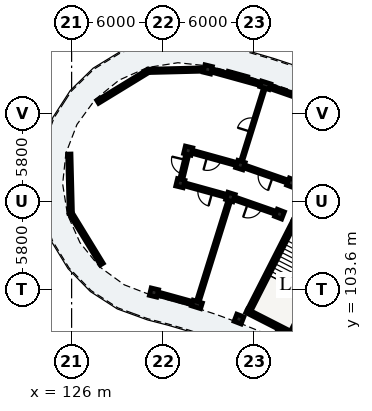
"""IFC4 building model, lengths in metres.
Left out: names, types, materials, properties, quantities, classifications, styles, units other than length and angle.
Written with IfcOpenShell. Run it as: python <this file> out.ifc"""

import sys

from ifc_helpers import new_model, si_unit, direction, frame, frame_2d, origin, origin_2d, place, context, subcontext, project, spatial, rectangle, extrude, element, fill, save


model = new_model("IFC4")
c1 = context("Model", 3, precision=1e-05, world=origin(), true_north=direction((0.0, 1.0)))
c2 = subcontext(c1, "Body", "Model", "MODEL_VIEW")
j1 = project(units=[si_unit("LENGTHUNIT", "METRE"), si_unit("PLANEANGLEUNIT", "RADIAN")], contexts=[c1])
p1 = place(None, origin())
s1 = spatial("IfcSite", under=j1, at=p1, CompositionType="ELEMENT")
p2 = place(p1, origin())
s2 = spatial("IfcBuilding", under=s1, at=p2, CompositionType="ELEMENT")
p3 = place(p2, frame((0.0, 0.0, 35.72)))
s3 = spatial("IfcBuildingStorey", under=s2, at=p3, CompositionType="ELEMENT", Elevation=35.72)
p4 = place(p3, frame((140.684, 108.139, 0.0), z_axis=(0.0, 0.0, 1.0), x_axis=(-0.453992276384, -0.891005618941, 0.0)))
e1 = element("IfcWall", 1, at=p4, inside=s3, PredefinedType="SHEAR", context=c2, shape_type="SweptSolid", body=[
    extrude(rectangle(XDim=6.6, YDim=0.25, at=frame_2d((3.3, 0.0))), origin(), (0.0, 0.0, 1.0), 3.11),
])
p5 = place(p3, frame((137.52, 102.203, 0.0), z_axis=(0.0, 0.0, 1.0), x_axis=(0.891003540237, -0.453996356025, 0.0)))
e2 = element("IfcWall", 2, at=p5, inside=s3, PredefinedType="SHEAR", context=c2, shape_type="SweptSolid", body=[
    extrude(rectangle(XDim=3.42, YDim=0.25, at=frame_2d((1.71, 0.0))), origin(), (0.0, 0.0, 1.0), 3.11),
])
p6 = place(p3, frame((143.509, 106.699, 0.0), z_axis=(0.0, 0.0, 1.0), x_axis=(-0.453992276384, -0.891005618941, 0.0)))
e3 = element("IfcWall", 3, at=p6, inside=s3, PredefinedType="SHEAR", context=c2, shape_type="SweptSolid", body=[
    extrude(rectangle(XDim=6.6, YDim=0.25, at=frame_2d((3.3, 0.0))), origin(), (0.0, 0.0, 1.0), 3.11),
])
p7 = place(p6, frame((0.22, 0.0, 0.0)))
e4 = element("IfcOpeningElement", 4, at=p7, cuts=e3, PredefinedType="OPENING", context=c2, shape_type="SweptSolid", body=[
    extrude(rectangle(XDim=1.05, YDim=2.15, at=frame_2d((0.525, 1.075))), frame((0.0, 0.135, 0.0), z_axis=(0.0, -1.0, 0.0), x_axis=(1.0, 0.0, 0.0)), (0.0, 0.0, 1.0), 0.27),
])
p8 = place(p3, frame((139.707, 100.522, 0.0), z_axis=(0.0, 0.0, 1.0), x_axis=(0.420859860775, 0.907125668024, 0.0)))
e5 = element("IfcColumn", 5, at=p8, inside=s3, PredefinedType="PILASTER", context=c2, shape_type="SweptSolid", body=[
    extrude(rectangle(XDim=0.39, YDim=0.63, at=origin_2d()), origin(), (0.0, 0.0, 1.0), 3.115),
])
for number, where, z_axis, x_axis in (
    (6, (137.01, 101.667, 0.0), (0.0, 0.0, 1.0), (0.36, 0.933, 0.0)),
    (7, (139.675, 108.57, 0.0), (0.0, 0.0, 1.0), (0.36, 0.933, 0.0)),
    (8, (140.468, 110.622, 0.0), (0.0, 0.0, 1.0), (0.36, 0.933, 0.0)),
):
    element("IfcColumn", number, at=place(p3, frame(where, z_axis=z_axis, x_axis=x_axis)), inside=s3, PredefinedType="COLUMN", context=c2, shape_type="SweptSolid", body=[
        extrude(rectangle(XDim=0.5, YDim=0.5, at=origin_2d()), origin(), (0.0, 0.0, 1.0), 3.115),
    ])
p9 = place(p3, frame((134.243, 102.631, 0.0), z_axis=(0.0, 0.0, 1.0), x_axis=(0.297930225503, 0.954587649581, 0.0)))
e9 = element("IfcColumn", 9, at=p9, inside=s3, PredefinedType="PILASTER", context=c2, shape_type="SweptSolid", body=[
    extrude(rectangle(XDim=0.39, YDim=0.63, at=origin_2d()), origin(), (0.0, 0.0, 1.0), 3.115),
])
for number, where, z_axis, x_axis in (
    (10, (136.448, 109.695, 0.0), (0.0, 0.0, 1.0), (0.298, 0.955, 0.0)),
    (11, (137.103, 111.795, 0.0), (0.0, 0.0, 1.0), (0.298, 0.955, 0.0)),
):
    element("IfcColumn", number, at=place(p3, frame(where, z_axis=z_axis, x_axis=x_axis)), inside=s3, PredefinedType="COLUMN", context=c2, shape_type="SweptSolid", body=[
        extrude(rectangle(XDim=0.5, YDim=0.5, at=origin_2d()), origin(), (0.0, 0.0, 1.0), 3.115),
    ])
p10 = place(p3, frame((138.742, 117.046, 0.0), z_axis=(0.0, 0.0, 1.0), x_axis=(0.297930225503, 0.954587649581, 0.0)))
e12 = element("IfcColumn", 12, at=p10, inside=s3, PredefinedType="PILASTER", context=c2, shape_type="SweptSolid", body=[
    extrude(rectangle(XDim=0.39, YDim=0.63, at=origin_2d()), origin(), (0.0, 0.0, 1.0), 3.115),
])
for number, where, z_axis, x_axis in (
    (13, (131.418, 103.412, 0.0), (0.0, 0.0, 1.0), (0.234, 0.972, 0.0)),
    (14, (133.153, 110.606, 0.0), (0.0, 0.0, 1.0), (0.234, 0.972, 0.0)),
    (15, (133.669, 112.744, 0.0), (0.0, 0.0, 1.0), (0.234, 0.972, 0.0)),
    (16, (134.958, 118.091, 0.0), (0.0, 0.0, 1.0), (0.234, 0.972, 0.0)),
):
    element("IfcColumn", number, at=place(p3, frame(where, z_axis=z_axis, x_axis=x_axis)), inside=s3, PredefinedType="COLUMN", context=c2, shape_type="SweptSolid", body=[
        extrude(rectangle(XDim=0.5, YDim=0.5, at=origin_2d()), origin(), (0.0, 0.0, 1.0), 3.115),
    ])
p11 = place(p3, frame((142.241, 115.826, 0.0), z_axis=(0.0, 0.0, 1.0), x_axis=(-0.944250036963, 0.329229202373, 0.0)))
e17 = element("IfcWall", 17, at=p11, inside=s3, PredefinedType="SOLIDWALL", context=c2, shape_type="SweptSolid", body=[
    extrude(rectangle(XDim=3.541, YDim=0.22, at=frame_2d((1.771, 0.0))), origin(), (0.0, 0.0, 1.0), 2.355),
])
p12 = place(p11, frame((1.17, 0.0, 0.55)))
e18 = element("IfcOpeningElement", 18, at=p12, cuts=e17, PredefinedType="OPENING", context=c2, shape_type="SweptSolid", body=[
    extrude(rectangle(XDim=1.2, YDim=1.51, at=frame_2d((0.6, 0.755))), frame((0.0, 0.12, 0.0), z_axis=(0.0, -1.0, 0.0), x_axis=(1.0, 0.0, 0.0)), (0.0, 0.0, 1.0), 0.24),
])
p13 = place(p3, frame((138.583, 117.09, 0.0), z_axis=(0.0, 0.0, 1.0), x_axis=(-0.963891366843, 0.266295762125, 0.0)))
e19 = element("IfcWall", 19, at=p13, inside=s3, PredefinedType="SOLIDWALL", context=c2, shape_type="SweptSolid", body=[
    extrude(rectangle(XDim=3.541, YDim=0.22, at=frame_2d((1.771, 0.0))), origin(), (0.0, 0.0, 1.0), 2.355),
])
p14 = place(p13, frame((1.11, 0.0, 0.55)))
e20 = element("IfcOpeningElement", 20, at=p14, cuts=e19, PredefinedType="OPENING", context=c2, shape_type="SweptSolid", body=[
    extrude(rectangle(XDim=1.32, YDim=1.585, at=frame_2d((0.66, 0.792))), frame((0.0, 0.12, 0.0), z_axis=(0.0, -1.0, 0.0), x_axis=(1.0, 0.0, 0.0)), (0.0, 0.0, 1.0), 0.24),
])
p15 = place(p3, frame((134.084, 102.675, 0.0), z_axis=(0.0, 0.0, 1.0), x_axis=(-0.963872968618, 0.26636234788, 0.0)))
e21 = element("IfcWall", 21, at=p15, inside=s3, PredefinedType="SOLIDWALL", context=c2, shape_type="SweptSolid", body=[
    extrude(rectangle(XDim=2.545, YDim=0.22, at=frame_2d((1.273, 0.0))), origin(), (0.0, 0.0, 1.0), 2.355),
])
p16 = place(p15, frame((0.473, 0.0, 0.55)))
e22 = element("IfcOpeningElement", 22, at=p16, cuts=e21, PredefinedType="OPENING", context=c2, shape_type="SweptSolid", body=[
    extrude(rectangle(XDim=1.6, YDim=1.535, at=frame_2d((0.8, 0.768))), frame((0.0, 0.12, 0.0), z_axis=(0.0, -1.0, 0.0), x_axis=(1.0, 0.0, 0.0)), (0.0, 0.0, 1.0), 0.24),
])
p17 = place(p3, frame((127.986, 105.28, 0.0), z_axis=(0.0, 0.0, 1.0), x_axis=(-0.521652131435, 0.85315828178, 0.0)))
e23 = element("IfcWall", 23, at=p17, inside=s3, PredefinedType="SOLIDWALL", context=c2, shape_type="SweptSolid", body=[
    extrude(rectangle(XDim=3.908, YDim=0.22, at=frame_2d((1.954, 0.0))), origin(), (0.0, 0.0, 1.0), 2.355),
])
p18 = place(p3, frame((125.947, 108.614, 0.0), z_axis=(0.0, 0.0, 1.0), x_axis=(-0.02523880178, 0.999681450706, 0.0)))
e24 = element("IfcWall", 24, at=p18, inside=s3, PredefinedType="SOLIDWALL", context=c2, shape_type="SweptSolid", body=[
    extrude(rectangle(XDim=3.908, YDim=0.22, at=frame_2d((1.954, 0.0))), origin(), (0.0, 0.0, 1.0), 2.355),
])
p19 = place(p18, frame((1.029, 0.0, 0.4)))
e25 = element("IfcOpeningElement", 25, at=p19, cuts=e24, PredefinedType="OPENING", context=c2, shape_type="SweptSolid", body=[
    extrude(rectangle(XDim=1.85, YDim=1.72, at=frame_2d((0.925, 0.86))), frame((0.0, 0.12, 0.0), z_axis=(0.0, -1.0, 0.0), x_axis=(1.0, 0.0, 0.0)), (0.0, 0.0, 1.0), 0.24),
])
p20 = place(p3, frame((127.717, 115.954, 0.0), z_axis=(0.0, 0.0, 1.0), x_axis=(0.85314128216, 0.521679933171, 0.0)))
e26 = element("IfcWall", 26, at=p20, inside=s3, PredefinedType="SOLIDWALL", context=c2, shape_type="SweptSolid", body=[
    extrude(rectangle(XDim=3.908, YDim=0.22, at=frame_2d((1.954, 0.0))), origin(), (0.0, 0.0, 1.0), 2.355),
])
p21 = place(p3, frame((131.051, 117.993, 0.0), z_axis=(0.0, 0.0, 1.0), x_axis=(0.999683064576, 0.025174796915, 0.0)))
e27 = element("IfcWall", 27, at=p21, inside=s3, PredefinedType="SOLIDWALL", context=c2, shape_type="SweptSolid", body=[
    extrude(rectangle(XDim=3.908, YDim=0.22, at=frame_2d((1.954, 0.0))), origin(), (0.0, 0.0, 1.0), 2.355),
])
p22 = place(p21, frame((1.029, 0.0, 0.4)))
e28 = element("IfcOpeningElement", 28, at=p22, cuts=e27, PredefinedType="OPENING", context=c2, shape_type="SweptSolid", body=[
    extrude(rectangle(XDim=1.85, YDim=1.72, at=frame_2d((0.925, 0.86))), frame((0.0, 0.12, 0.0), z_axis=(0.0, -1.0, 0.0), x_axis=(1.0, 0.0, 0.0)), (0.0, 0.0, 1.0), 0.24),
])
p23 = place(p3, frame((140.137, 110.738, 0.0), z_axis=(0.0, 0.0, 1.0), x_axis=(-0.944253820929, 0.329218349522, 0.0)))
e29 = element("IfcWall", 29, at=p23, inside=s3, PredefinedType="PARTITIONING", context=c2, shape_type="SweptSolid", body=[
    extrude(rectangle(XDim=2.863, YDim=0.205, at=frame_2d((1.432, 0.0))), origin(), (0.0, 0.0, 1.0), 2.37),
])
p24 = place(p23, frame((0.947, 0.0, 0.0)))
e30 = element("IfcOpeningElement", 30, at=p24, cuts=e29, PredefinedType="OPENING", context=c2, shape_type="SweptSolid", body=[
    extrude(rectangle(XDim=0.97, YDim=2.15, at=frame_2d((0.485, 1.075))), frame((0.0, 0.113, 0.0), z_axis=(0.0, -1.0, 0.0), x_axis=(1.0, 0.0, 0.0)), (0.0, 0.0, 1.0), 0.225),
])
p25 = place(p3, frame((139.345, 108.685, 0.0), z_axis=(0.0, 0.0, 1.0), x_axis=(-0.944265123647, 0.329185929627, 0.0)))
e31 = element("IfcWall", 31, at=p25, inside=s3, PredefinedType="PARTITIONING", context=c2, shape_type="SweptSolid", body=[
    extrude(rectangle(XDim=2.718, YDim=0.205, at=frame_2d((1.359, 0.0))), origin(), (0.0, 0.0, 1.0), 2.37),
])
p26 = place(p25, frame((0.874, 0.0, 0.0)))
e32 = element("IfcOpeningElement", 32, at=p26, cuts=e31, PredefinedType="OPENING", context=c2, shape_type="SweptSolid", body=[
    extrude(rectangle(XDim=0.97, YDim=2.15, at=frame_2d((0.485, 1.075))), frame((0.0, 0.113, 0.0), z_axis=(0.0, -1.0, 0.0), x_axis=(1.0, 0.0, 0.0)), (0.0, 0.0, 1.0), 0.225),
])
p27 = place(p3, frame((137.222, 112.177, 0.0), z_axis=(0.0, 0.0, 1.0), x_axis=(0.297905254614, 0.954595442726, 0.0)))
e33 = element("IfcWall", 33, at=p27, inside=s3, PredefinedType="PARTITIONING", context=c2, shape_type="SweptSolid", body=[
    extrude(rectangle(XDim=4.7, YDim=0.125, at=frame_2d((2.35, 0.0))), origin(), (0.0, 0.0, 1.0), 2.37),
])
p28 = place(p27, frame((1.895, 0.0, 0.0)))
e34 = element("IfcOpeningElement", 34, at=p28, cuts=e33, PredefinedType="OPENING", context=c2, shape_type="SweptSolid", body=[
    extrude(rectangle(XDim=0.91, YDim=2.1, at=frame_2d((0.455, 1.05))), frame((0.0, 0.073, 0.0), z_axis=(0.0, -1.0, 0.0), x_axis=(1.0, 0.0, 0.0)), (0.0, 0.0, 1.0), 0.145),
])
p29 = place(p3, frame((134.362, 103.013, 0.0), z_axis=(0.0, 0.0, 1.0), x_axis=(0.2979590431, 0.954578655028, 0.0)))
e35 = element("IfcWall", 35, at=p29, inside=s3, PredefinedType="PARTITIONING", context=c2, shape_type="SweptSolid", body=[
    extrude(rectangle(XDim=6.6, YDim=0.185, at=frame_2d((3.3, 0.0))), origin(), (0.0, 0.0, 1.0), 2.37),
])
p30 = place(p3, frame((136.766, 111.889, 0.0), z_axis=(0.0, 0.0, 1.0), x_axis=(-0.963890789093, 0.266297853356, 0.0)))
e36 = element("IfcWall", 36, at=p30, inside=s3, PredefinedType="PARTITIONING", context=c2, shape_type="SweptSolid", body=[
    extrude(rectangle(XDim=2.863, YDim=0.205, at=frame_2d((1.432, 0.0))), origin(), (0.0, 0.0, 1.0), 2.37),
])
p31 = place(p30, frame((0.957, 0.0, 0.0)))
e37 = element("IfcOpeningElement", 37, at=p31, cuts=e36, PredefinedType="OPENING", context=c2, shape_type="SweptSolid", body=[
    extrude(rectangle(XDim=0.95, YDim=2.13, at=frame_2d((0.475, 1.065))), frame((0.0, 0.113, 0.0), z_axis=(0.0, -1.0, 0.0), x_axis=(1.0, 0.0, 0.0)), (0.0, 0.0, 1.0), 0.225),
])
p32 = place(p3, frame((136.11, 109.789, 0.0), z_axis=(0.0, 0.0, 1.0), x_axis=(-0.96388375821, 0.266323301006, 0.0)))
e38 = element("IfcWall", 38, at=p32, inside=s3, PredefinedType="PARTITIONING", context=c2, shape_type="SweptSolid", body=[
    extrude(rectangle(XDim=2.718, YDim=0.205, at=frame_2d((1.359, 0.0))), origin(), (0.0, 0.0, 1.0), 2.37),
])
p33 = place(p32, frame((0.884, 0.0, 0.0)))
e39 = element("IfcOpeningElement", 39, at=p33, cuts=e38, PredefinedType="OPENING", context=c2, shape_type="SweptSolid", body=[
    extrude(rectangle(XDim=0.95, YDim=2.13, at=frame_2d((0.475, 1.065))), frame((0.0, 0.113, 0.0), z_axis=(0.0, -1.0, 0.0), x_axis=(1.0, 0.0, 0.0)), (0.0, 0.0, 1.0), 0.225),
])
p34 = place(p3, frame((133.165, 110.654, 0.0), z_axis=(0.0, 0.0, 1.0), x_axis=(0.23437535251, 0.972146179407, 0.0)))
e40 = element("IfcWall", 40, at=p34, inside=s3, PredefinedType="PARTITIONING", context=c2, shape_type="SweptSolid", body=[
    extrude(rectangle(XDim=2.1, YDim=0.205, at=frame_2d((1.05, 0.0))), origin(), (0.0, 0.0, 1.0), 2.37),
])
p35 = place(p34, frame((0.57, 0.0, 0.0)))
e41 = element("IfcOpeningElement", 41, at=p35, cuts=e40, PredefinedType="OPENING", context=c2, shape_type="SweptSolid", body=[
    extrude(rectangle(XDim=0.95, YDim=2.13, at=frame_2d((0.475, 1.065))), frame((0.0, 0.113, 0.0), z_axis=(0.0, -1.0, 0.0), x_axis=(1.0, 0.0, 0.0)), (0.0, 0.0, 1.0), 0.225),
])
p36 = place(p12, origin())
e42 = element("IfcWindow", 42, at=p36, inside=s3, PartitioningType="SINGLE_PANEL", PredefinedType="WINDOW", context=c2, shape_type="SweptSolid", body=[
    extrude(rectangle(XDim=1.2, YDim=1.51, at=frame_2d((0.6, 0.755))), frame((0.0, 0.03, 0.0), z_axis=(0.0, -1.0, 0.0), x_axis=(1.0, 0.0, 0.0)), (0.0, 0.0, 1.0), 0.06),
])
fill(e18, e42)
p37 = place(p14, origin())
e43 = element("IfcWindow", 43, at=p37, inside=s3, PartitioningType="SINGLE_PANEL", PredefinedType="WINDOW", context=c2, shape_type="SweptSolid", body=[
    extrude(rectangle(XDim=1.32, YDim=1.585, at=frame_2d((0.66, 0.792))), frame((0.0, 0.03, 0.0), z_axis=(0.0, -1.0, 0.0), x_axis=(1.0, 0.0, 0.0)), (0.0, 0.0, 1.0), 0.06),
])
fill(e20, e43)
p38 = place(p16, origin())
e44 = element("IfcWindow", 44, at=p38, inside=s3, PartitioningType="SINGLE_PANEL", PredefinedType="WINDOW", context=c2, shape_type="SweptSolid", body=[
    extrude(rectangle(XDim=1.6, YDim=1.535, at=frame_2d((0.8, 0.768))), frame((0.0, 0.03, 0.0), z_axis=(0.0, -1.0, 0.0), x_axis=(1.0, 0.0, 0.0)), (0.0, 0.0, 1.0), 0.06),
])
fill(e22, e44)
p39 = place(p19, origin())
e45 = element("IfcWindow", 45, at=p39, inside=s3, PartitioningType="SINGLE_PANEL", PredefinedType="WINDOW", context=c2, shape_type="SweptSolid", body=[
    extrude(rectangle(XDim=1.85, YDim=1.72, at=frame_2d((0.925, 0.86))), frame((0.0, 0.03, 0.0), z_axis=(0.0, -1.0, 0.0), x_axis=(1.0, 0.0, 0.0)), (0.0, 0.0, 1.0), 0.06),
])
fill(e25, e45)
p40 = place(p22, origin())
e46 = element("IfcWindow", 46, at=p40, inside=s3, PartitioningType="SINGLE_PANEL", PredefinedType="WINDOW", context=c2, shape_type="SweptSolid", body=[
    extrude(rectangle(XDim=1.85, YDim=1.72, at=frame_2d((0.925, 0.86))), frame((0.0, 0.03, 0.0), z_axis=(0.0, -1.0, 0.0), x_axis=(1.0, 0.0, 0.0)), (0.0, 0.0, 1.0), 0.06),
])
fill(e28, e46)
p41 = place(p24, origin())
e47 = element("IfcDoor", 47, at=p41, inside=s3, OperationType="SINGLE_SWING_LEFT", PredefinedType="DOOR", context=c2, shape_type="SweptSolid", body=[
    extrude(rectangle(XDim=0.97, YDim=2.15, at=frame_2d((0.485, 1.075))), frame((0.0, 0.025, 0.0), z_axis=(0.0, -1.0, 0.0), x_axis=(1.0, 0.0, 0.0)), (0.0, 0.0, 1.0), 0.05),
])
fill(e30, e47)
p42 = place(p26, origin())
e48 = element("IfcDoor", 48, at=p42, inside=s3, OperationType="SINGLE_SWING_RIGHT", PredefinedType="DOOR", context=c2, shape_type="SweptSolid", body=[
    extrude(rectangle(XDim=0.97, YDim=2.15, at=frame_2d((0.485, 1.075))), frame((0.0, 0.025, 0.0), z_axis=(0.0, -1.0, 0.0), x_axis=(1.0, 0.0, 0.0)), (0.0, 0.0, 1.0), 0.05),
])
fill(e32, e48)
p43 = place(p28, origin())
e49 = element("IfcDoor", 49, at=p43, inside=s3, OperationType="SINGLE_SWING_LEFT", PredefinedType="DOOR", context=c2, shape_type="SweptSolid", body=[
    extrude(rectangle(XDim=0.91, YDim=2.1, at=frame_2d((0.455, 1.05))), frame((0.0, 0.025, 0.0), z_axis=(0.0, -1.0, 0.0), x_axis=(1.0, 0.0, 0.0)), (0.0, 0.0, 1.0), 0.05),
])
fill(e34, e49)
p44 = place(p31, origin())
e50 = element("IfcDoor", 50, at=p44, inside=s3, OperationType="SINGLE_SWING_RIGHT", PredefinedType="DOOR", context=c2, shape_type="SweptSolid", body=[
    extrude(rectangle(XDim=0.95, YDim=2.13, at=frame_2d((0.475, 1.065))), frame((0.0, 0.025, 0.0), z_axis=(0.0, -1.0, 0.0), x_axis=(1.0, 0.0, 0.0)), (0.0, 0.0, 1.0), 0.05),
])
fill(e37, e50)
p45 = place(p33, origin())
e51 = element("IfcDoor", 51, at=p45, inside=s3, OperationType="SINGLE_SWING_LEFT", PredefinedType="DOOR", context=c2, shape_type="SweptSolid", body=[
    extrude(rectangle(XDim=0.95, YDim=2.13, at=frame_2d((0.475, 1.065))), frame((0.0, 0.025, 0.0), z_axis=(0.0, -1.0, 0.0), x_axis=(1.0, 0.0, 0.0)), (0.0, 0.0, 1.0), 0.05),
])
fill(e39, e51)
p46 = place(p35, origin())
e52 = element("IfcDoor", 52, at=p46, inside=s3, OperationType="SINGLE_SWING_RIGHT", PredefinedType="DOOR", context=c2, shape_type="SweptSolid", body=[
    extrude(rectangle(XDim=0.95, YDim=2.13, at=frame_2d((0.475, 1.065))), frame((0.0, 0.025, 0.0), z_axis=(0.0, -1.0, 0.0), x_axis=(1.0, 0.0, 0.0)), (0.0, 0.0, 1.0), 0.05),
])
fill(e41, e52)
save(model, sys.argv[1])
